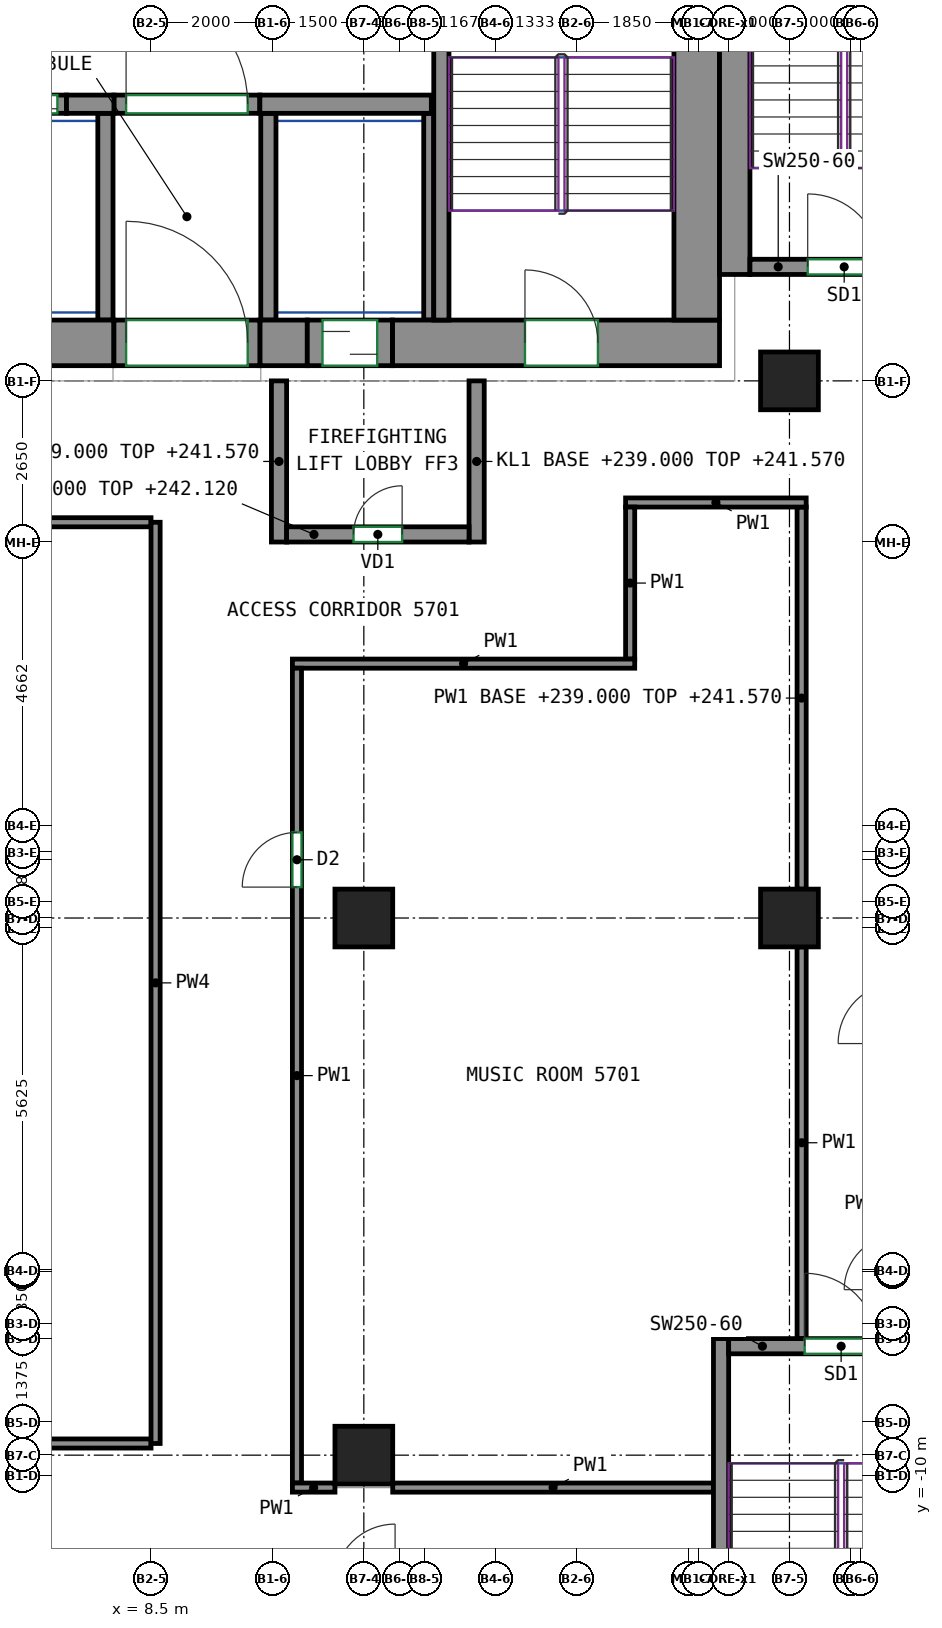
"""IFC4 building model, lengths in metres.
Left out: names, types, materials, properties, quantities, classifications, styles, units other than length and angle.
Written with IfcOpenShell. Run it as: python <this file> out.ifc"""

import sys

from ifc_helpers import new_model, si_unit, direction, frame, frame_2d, origin, origin_2d, place, context, subcontext, project, spatial, rectangle, extrude, source, transform, mapped, element, fill, save


model = new_model("IFC4")
c1 = context("Model", 3, precision=1e-05, world=origin(), true_north=direction((0.0, 1.0)))
c2 = subcontext(c1, "Body", "Model", "MODEL_VIEW")
j1 = project(units=[si_unit("LENGTHUNIT", "METRE"), si_unit("PLANEANGLEUNIT", "RADIAN")], contexts=[c1])
p1 = place(None, origin())
s1 = spatial("IfcSite", under=j1, at=p1, CompositionType="ELEMENT")
p2 = place(p1, origin())
s2 = spatial("IfcBuilding", under=s1, at=p2, CompositionType="ELEMENT")
p3 = place(p2, frame((0.0, 0.0, 239.0)))
s3 = spatial("IfcBuildingStorey", under=s2, at=p3, CompositionType="ELEMENT", Elevation=239.0)
m1 = source(origin(), c2, "Body", "SweptSolid", [
    extrude(rectangle(XDim=0.95, YDim=0.95, at=origin_2d()), origin(), (0.0, 0.0, 1.0), 3.12),
])
for number, where, z_axis, x_axis in (
    (1, (12.0, -9.667, 0.0), (0.0, 0.0, 1.0), (1.0, 0.0, 0.0)),
    (2, (12.0, -0.833, 0.0), (0.0, 0.0, 1.0), (1.0, 0.0, 0.0)),
    (3, (19.0, -0.833, 0.0), (0.0, 0.0, 1.0), (1.0, 0.0, 0.0)),
    (4, (19.0, 8.0, 0.0), (0.0, 0.0, 1.0), (1.0, 0.0, 0.0)),
):
    element("IfcColumn", number, at=place(p3, frame(where, z_axis=z_axis, x_axis=x_axis)), inside=s3, PredefinedType="COLUMN", context=c2, shape_type="MappedRepresentation", body=[
        mapped(m1, transform((0.0, 0.0, 0.0))),
    ])
m2 = source(origin(), c2, "Body", "SweptSolid", [
    extrude(rectangle(XDim=14.18, YDim=0.75, at=frame_2d((7.09, 0.0))), origin(), (0.0, 0.0, 1.0), 3.12),
])
p4 = place(p3, frame((-6.29, 8.625, 0.0), z_axis=(0.0, 0.0, 1.0), x_axis=(1.0, 0.0, 0.0)))
e5 = element("IfcWall", 5, at=p4, inside=s3, PredefinedType="SHEAR", context=c2, shape_type="MappedRepresentation", body=[
    mapped(m2, transform((0.0, 0.0, 0.0))),
])
m3 = source(origin(), c2, "Body", "SweptSolid", [
    extrude(rectangle(XDim=0.78, YDim=0.75, at=frame_2d((0.39, 0.0))), origin(), (0.0, 0.0, 1.0), 3.12),
])
p5 = place(p3, frame((10.29, 8.625, 0.0), z_axis=(0.0, 0.0, 1.0), x_axis=(1.0, 0.0, 0.0)))
e6 = element("IfcWall", 6, at=p5, inside=s3, PredefinedType="SHEAR", context=c2, shape_type="MappedRepresentation", body=[
    mapped(m3, transform((0.0, 0.0, 0.0))),
])
m4 = source(origin(), c2, "Body", "SweptSolid", [
    extrude(rectangle(XDim=5.38, YDim=0.75, at=frame_2d((2.69, 0.0))), origin(), (0.0, 0.0, 1.0), 3.12),
])
p6 = place(p3, frame((12.47, 8.625, 0.0), z_axis=(0.0, 0.0, 1.0), x_axis=(1.0, 0.0, 0.0)))
e7 = element("IfcWall", 7, at=p6, inside=s3, PredefinedType="SHEAR", context=c2, shape_type="MappedRepresentation", body=[
    mapped(m4, transform((0.0, 0.0, 0.0))),
])
p7 = place(p6, frame((2.18, 0.0, 0.0)))
e8 = element("IfcOpeningElement", 8, at=p7, cuts=e7, PredefinedType="OPENING", context=c2, shape_type="SweptSolid", body=[
    extrude(rectangle(XDim=1.2, YDim=2.1, at=frame_2d((0.6, 1.05))), frame((0.0, 0.385, 0.0), z_axis=(0.0, -1.0, 0.0), x_axis=(1.0, 0.0, 0.0)), (0.0, 0.0, 1.0), 0.77),
])
m5 = source(origin(), c2, "Body", "SweptSolid", [
    extrude(rectangle(XDim=12.0, YDim=0.75, at=frame_2d((6.0, 0.0))), origin(), (0.0, 0.0, 1.0), 3.12),
])
p8 = place(p3, frame((17.475, 9.0, 0.0), z_axis=(0.0, 0.0, 1.0), x_axis=(0.0, 1.0, 0.0)))
e9 = element("IfcWall", 9, at=p8, inside=s3, PredefinedType="SHEAR", context=c2, shape_type="MappedRepresentation", body=[
    mapped(m5, transform((0.0, 0.0, 0.0))),
])
m6 = source(origin(), c2, "Body", "SweptSolid", [
    extrude(rectangle(XDim=7.75, YDim=0.25, at=frame_2d((3.875, 0.0))), origin(), (0.0, 0.0, 1.0), 3.12),
])
p9 = place(p3, frame((13.275, 9.0, 0.0), z_axis=(0.0, 0.0, 1.0), x_axis=(0.0, 1.0, 0.0)))
e10 = element("IfcWall", 10, at=p9, inside=s3, PredefinedType="SHEAR", context=c2, shape_type="MappedRepresentation", body=[
    mapped(m6, transform((0.0, 0.0, 0.0))),
])
m7 = source(origin(), c2, "Body", "SweptSolid", [
    extrude(rectangle(XDim=8.0, YDim=0.25, at=frame_2d((4.0, 0.0))), origin(), (0.0, 0.0, 1.0), 3.12),
])
p10 = place(p3, frame((17.875, -15.75, 0.0), z_axis=(0.0, 0.0, 1.0), x_axis=(0.0, 1.0, 0.0)))
e11 = element("IfcWall", 11, at=p10, inside=s3, PredefinedType="SHEAR", context=c2, shape_type="MappedRepresentation", body=[
    mapped(m7, transform((0.0, 0.0, 0.0))),
])
m8 = source(origin(), c2, "Body", "SweptSolid", [
    extrude(rectangle(XDim=3.7, YDim=0.25, at=frame_2d((1.85, 0.0))), origin(), (0.0, 0.0, 1.0), 3.12),
])
p11 = place(p3, frame((18.0, -7.875, 0.0), z_axis=(0.0, 0.0, 1.0), x_axis=(1.0, 0.0, 0.0)))
e12 = element("IfcWall", 12, at=p11, inside=s3, PredefinedType="SHEAR", context=c2, shape_type="MappedRepresentation", body=[
    mapped(m8, transform((0.0, 0.0, 0.0))),
])
p12 = place(p11, frame((1.25, 0.0, 0.0)))
e13 = element("IfcOpeningElement", 13, at=p12, cuts=e12, PredefinedType="OPENING", context=c2, shape_type="SweptSolid", body=[
    extrude(rectangle(XDim=1.2, YDim=2.1, at=frame_2d((0.6, 1.05))), frame((0.0, 0.135, 0.0), z_axis=(0.0, -1.0, 0.0), x_axis=(1.0, 0.0, 0.0)), (0.0, 0.0, 1.0), 0.27),
])
m9 = source(origin(), c2, "Body", "SweptSolid", [
    extrude(rectangle(XDim=8.0, YDim=0.5, at=frame_2d((4.0, 0.0))), origin(), (0.0, 0.0, 1.0), 3.12),
])
p13 = place(p3, frame((18.1, 9.75, 0.0), z_axis=(0.0, 0.0, 1.0), x_axis=(0.0, 1.0, 0.0)))
e14 = element("IfcWall", 14, at=p13, inside=s3, PredefinedType="SHEAR", context=c2, shape_type="MappedRepresentation", body=[
    mapped(m9, transform((0.0, 0.0, 0.0))),
])
m10 = source(origin(), c2, "Body", "SweptSolid", [
    extrude(rectangle(XDim=3.1, YDim=0.25, at=frame_2d((1.55, 0.0))), origin(), (0.0, 0.0, 1.0), 3.12),
])
p14 = place(p3, frame((18.35, 9.875, 0.0), z_axis=(0.0, 0.0, 1.0), x_axis=(1.0, 0.0, 0.0)))
e15 = element("IfcWall", 15, at=p14, inside=s3, PredefinedType="SHEAR", context=c2, shape_type="MappedRepresentation", body=[
    mapped(m10, transform((0.0, 0.0, 0.0))),
])
p15 = place(p14, frame((0.95, 0.0, 0.0)))
e16 = element("IfcOpeningElement", 16, at=p15, cuts=e15, PredefinedType="OPENING", context=c2, shape_type="SweptSolid", body=[
    extrude(rectangle(XDim=1.2, YDim=2.1, at=frame_2d((0.6, 1.05))), frame((0.0, 0.135, 0.0), z_axis=(0.0, -1.0, 0.0), x_axis=(1.0, 0.0, 0.0)), (0.0, 0.0, 1.0), 0.27),
])
m11 = source(origin(), c2, "Body", "SweptSolid", [
    extrude(rectangle(XDim=0.78, YDim=0.3, at=frame_2d((0.39, 0.0))), origin(), (0.0, 0.0, 1.0), 3.12),
])
p16 = place(p3, frame((7.11, 12.55, 0.0), z_axis=(0.0, 0.0, 1.0), x_axis=(1.0, 0.0, 0.0)))
e17 = element("IfcWall", 17, at=p16, inside=s3, PredefinedType="SHEAR", context=c2, shape_type="MappedRepresentation", body=[
    mapped(m11, transform((0.0, 0.0, 0.0))),
])
m12 = source(origin(), c2, "Body", "SweptSolid", [
    extrude(rectangle(XDim=2.82, YDim=0.3, at=frame_2d((1.41, 0.0))), origin(), (0.0, 0.0, 1.0), 3.12),
])
p17 = place(p3, frame((10.29, 12.55, 0.0), z_axis=(0.0, 0.0, 1.0), x_axis=(1.0, 0.0, 0.0)))
e18 = element("IfcWall", 18, at=p17, inside=s3, PredefinedType="SHEAR", context=c2, shape_type="MappedRepresentation", body=[
    mapped(m12, transform((0.0, 0.0, 0.0))),
])
m13 = source(origin(), c2, "Body", "SweptSolid", [
    extrude(rectangle(XDim=1.4, YDim=0.3, at=frame_2d((0.7, 0.0))), origin(), (0.0, 0.0, 1.0), 3.12),
])
p18 = place(p3, frame((5.71, 12.55, 0.0), z_axis=(0.0, 0.0, 1.0), x_axis=(1.0, 0.0, 0.0)))
e19 = element("IfcWall", 19, at=p18, inside=s3, PredefinedType="PARTITIONING", context=c2, shape_type="MappedRepresentation", body=[
    mapped(m13, transform((0.0, 0.0, 0.0))),
])
p19 = place(p18, frame((0.15, 0.0, 0.0)))
e20 = element("IfcOpeningElement", 20, at=p19, cuts=e19, PredefinedType="OPENING", context=c2, shape_type="SweptSolid", body=[
    extrude(rectangle(XDim=1.1, YDim=2.1, at=frame_2d((0.55, 1.05))), frame((0.0, 0.16, 0.0), z_axis=(0.0, -1.0, 0.0), x_axis=(1.0, 0.0, 0.0)), (0.0, 0.0, 1.0), 0.32),
])
m14 = source(origin(), c2, "Body", "SweptSolid", [
    extrude(rectangle(XDim=2.4, YDim=0.3, at=frame_2d((1.2, 0.0))), origin(), (0.0, 0.0, 1.0), 3.12),
])
p20 = place(p3, frame((7.89, 12.55, 0.0), z_axis=(0.0, 0.0, 1.0), x_axis=(1.0, 0.0, 0.0)))
e21 = element("IfcWall", 21, at=p20, inside=s3, PredefinedType="PARTITIONING", context=c2, shape_type="MappedRepresentation", body=[
    mapped(m14, transform((0.0, 0.0, 0.0))),
])
p21 = place(p20, frame((0.2, 0.0, 0.0)))
e22 = element("IfcOpeningElement", 22, at=p21, cuts=e21, PredefinedType="OPENING", context=c2, shape_type="SweptSolid", body=[
    extrude(rectangle(XDim=2.0, YDim=2.1, at=frame_2d((1.0, 1.05))), frame((0.0, 0.16, 0.0), z_axis=(0.0, -1.0, 0.0), x_axis=(1.0, 0.0, 0.0)), (0.0, 0.0, 1.0), 0.32),
])
m15 = source(origin(), c2, "Body", "SweptSolid", [
    extrude(rectangle(XDim=2.65, YDim=0.25, at=frame_2d((1.325, 0.0))), origin(), (0.0, 0.0, 1.0), 2.57),
])
for number, where, z_axis, x_axis in (
    (23, (10.605, 5.35, 0.0), (0.0, 0.0, 1.0), (0.0, 1.0, 0.0)),
    (24, (13.855, 5.35, 0.0), (0.0, 0.0, 1.0), (0.0, 1.0, 0.0)),
):
    element("IfcWall", number, at=place(p3, frame(where, z_axis=z_axis, x_axis=x_axis)), inside=s3, PredefinedType="PARTITIONING", context=c2, shape_type="MappedRepresentation", body=[
        mapped(m15, transform((0.0, 0.0, 0.0))),
    ])
m16 = source(origin(), c2, "Body", "SweptSolid", [
    extrude(rectangle(XDim=3.0, YDim=0.25, at=frame_2d((1.5, 0.0))), origin(), (0.0, 0.0, 1.0), 3.12),
])
p22 = place(p3, frame((10.73, 5.475, 0.0), z_axis=(0.0, 0.0, 1.0), x_axis=(1.0, 0.0, 0.0)))
e25 = element("IfcWall", 25, at=p22, inside=s3, PredefinedType="PARTITIONING", context=c2, shape_type="MappedRepresentation", body=[
    mapped(m16, transform((0.0, 0.0, 0.0))),
])
p23 = place(p22, frame((1.1, 0.0, 0.0)))
e26 = element("IfcOpeningElement", 26, at=p23, cuts=e25, PredefinedType="OPENING", context=c2, shape_type="SweptSolid", body=[
    extrude(rectangle(XDim=0.8, YDim=2.0, at=frame_2d((0.4, 1.0))), frame((0.0, 0.135, 0.0), z_axis=(0.0, -1.0, 0.0), x_axis=(1.0, 0.0, 0.0)), (0.0, 0.0, 1.0), 0.27),
])
m17 = source(origin(), c2, "Body", "SweptSolid", [
    extrude(rectangle(XDim=3.4, YDim=0.25, at=frame_2d((1.7, 0.0))), origin(), (0.0, 0.0, 1.0), 3.12),
])
p24 = place(p3, frame((10.43, 9.0, 0.0), z_axis=(0.0, 0.0, 1.0), x_axis=(0.0, 1.0, 0.0)))
e27 = element("IfcWall", 27, at=p24, inside=s3, PredefinedType="PARTITIONING", context=c2, shape_type="MappedRepresentation", body=[
    mapped(m17, transform((0.0, 0.0, 0.0))),
])
m18 = source(origin(), c2, "Body", "SweptSolid", [
    extrude(rectangle(XDim=3.4, YDim=0.165, at=frame_2d((1.7, 0.0))), origin(), (0.0, 0.0, 1.0), 3.12),
])
p25 = place(p3, frame((13.067, 9.0, 0.0), z_axis=(0.0, 0.0, 1.0), x_axis=(0.0, 1.0, 0.0)))
e28 = element("IfcWall", 28, at=p25, inside=s3, PredefinedType="PARTITIONING", context=c2, shape_type="MappedRepresentation", body=[
    mapped(m18, transform((0.0, 0.0, 0.0))),
])
p26 = place(p3, frame((7.75, 9.0, 0.0), z_axis=(0.0, 0.0, 1.0), x_axis=(0.0, 1.0, 0.0)))
e29 = element("IfcWall", 29, at=p26, inside=s3, PredefinedType="PARTITIONING", context=c2, shape_type="MappedRepresentation", body=[
    mapped(m17, transform((0.0, 0.0, 0.0))),
])
m19 = source(origin(), c2, "Body", "SweptSolid", [
    extrude(rectangle(XDim=2.4, YDim=0.75, at=frame_2d((1.2, 0.0))), origin(), (0.0, 0.0, 1.0), 2.7),
])
p27 = place(p3, frame((7.89, 8.625, 0.0), z_axis=(0.0, 0.0, 1.0), x_axis=(1.0, 0.0, 0.0)))
e30 = element("IfcWall", 30, at=p27, inside=s3, PredefinedType="PARTITIONING", context=c2, shape_type="MappedRepresentation", body=[
    mapped(m19, transform((0.0, 0.0, 0.0))),
])
p28 = place(p27, frame((0.2, 0.0, 0.0)))
e31 = element("IfcOpeningElement", 31, at=p28, cuts=e30, PredefinedType="OPENING", context=c2, shape_type="SweptSolid", body=[
    extrude(rectangle(XDim=2.0, YDim=2.1, at=frame_2d((1.0, 1.05))), frame((0.0, 0.385, 0.0), z_axis=(0.0, -1.0, 0.0), x_axis=(1.0, 0.0, 0.0)), (0.0, 0.0, 1.0), 0.77),
])
m20 = source(origin(), c2, "Body", "SweptSolid", [
    extrude(rectangle(XDim=1.4, YDim=0.75, at=frame_2d((0.7, 0.0))), origin(), (0.0, 0.0, 1.0), 2.7),
])
p29 = place(p3, frame((11.07, 8.625, 0.0), z_axis=(0.0, 0.0, 1.0), x_axis=(1.0, 0.0, 0.0)))
e32 = element("IfcWall", 32, at=p29, inside=s3, PredefinedType="PARTITIONING", context=c2, shape_type="MappedRepresentation", body=[
    mapped(m20, transform((0.0, 0.0, 0.0))),
])
p30 = place(p29, frame((0.25, 0.0, 0.0)))
e33 = element("IfcOpeningElement", 33, at=p30, cuts=e32, PredefinedType="OPENING", context=c2, shape_type="SweptSolid", body=[
    extrude(rectangle(XDim=0.9, YDim=2.1, at=frame_2d((0.45, 1.05))), frame((0.0, 0.385, 0.0), z_axis=(0.0, -1.0, 0.0), x_axis=(1.0, 0.0, 0.0)), (0.0, 0.0, 1.0), 0.77),
])
p31 = place(p3, frame((19.2, -7.75, 0.0), z_axis=(0.0, 0.0, 1.0), x_axis=(0.0, 1.0, 0.0)))
e34 = element("IfcWall", 34, at=p31, inside=s3, PredefinedType="PARTITIONING", context=c2, shape_type="SweptSolid", body=[
    extrude(rectangle(XDim=6.442, YDim=0.15, at=frame_2d((3.221, 0.0))), origin(), (0.0, 0.0, 1.0), 3.12),
])
p32 = place(p3, frame((19.2, -0.358, 0.0), z_axis=(0.0, 0.0, 1.0), x_axis=(0.0, 1.0, 0.0)))
e35 = element("IfcWall", 35, at=p32, inside=s3, PredefinedType="PARTITIONING", context=c2, shape_type="SweptSolid", body=[
    extrude(rectangle(XDim=6.283, YDim=0.15, at=frame_2d((3.142, 0.0))), origin(), (0.0, 0.0, 1.0), 2.57),
])
p33 = place(p3, frame((16.305, 6.0, 0.0), z_axis=(0.0, 0.0, 1.0), x_axis=(1.0, 0.0, 0.0)))
e36 = element("IfcWall", 36, at=p33, inside=s3, PredefinedType="PARTITIONING", context=c2, shape_type="SweptSolid", body=[
    extrude(rectangle(XDim=2.97, YDim=0.15, at=frame_2d((1.485, 0.0))), origin(), (0.0, 0.0, 1.0), 3.12),
])
p34 = place(p3, frame((16.38, 3.425, 0.0), z_axis=(0.0, 0.0, 1.0), x_axis=(0.0, 1.0, 0.0)))
e37 = element("IfcWall", 37, at=p34, inside=s3, PredefinedType="PARTITIONING", context=c2, shape_type="SweptSolid", body=[
    extrude(rectangle(XDim=2.5, YDim=0.15, at=frame_2d((1.25, 0.0))), origin(), (0.0, 0.0, 1.0), 3.12),
])
p35 = place(p3, frame((10.825, 3.35, 0.0), z_axis=(0.0, 0.0, 1.0), x_axis=(1.0, 0.0, 0.0)))
e38 = element("IfcWall", 38, at=p35, inside=s3, PredefinedType="PARTITIONING", context=c2, shape_type="SweptSolid", body=[
    extrude(rectangle(XDim=5.63, YDim=0.15, at=frame_2d((2.815, 0.0))), origin(), (0.0, 0.0, 1.0), 3.12),
])
p36 = place(p3, frame((10.9, -10.125, 0.0), z_axis=(0.0, 0.0, 1.0), x_axis=(0.0, 1.0, 0.0)))
e39 = element("IfcWall", 39, at=p36, inside=s3, PredefinedType="PARTITIONING", context=c2, shape_type="SweptSolid", body=[
    extrude(rectangle(XDim=13.4, YDim=0.15, at=frame_2d((6.7, 0.0))), origin(), (0.0, 0.0, 1.0), 3.12),
])
p37 = place(p36, frame((9.8, 0.0, 0.0)))
e40 = element("IfcOpeningElement", 40, at=p37, cuts=e39, PredefinedType="OPENING", context=c2, shape_type="SweptSolid", body=[
    extrude(rectangle(XDim=0.9, YDim=2.1, at=frame_2d((0.45, 1.05))), frame((0.0, 0.085, 0.0), z_axis=(0.0, -1.0, 0.0), x_axis=(1.0, 0.0, 0.0)), (0.0, 0.0, 1.0), 0.17),
])
p38 = place(p3, frame((12.475, -10.2, 0.0), z_axis=(0.0, 0.0, 1.0), x_axis=(1.0, 0.0, 0.0)))
e41 = element("IfcWall", 41, at=p38, inside=s3, PredefinedType="PARTITIONING", context=c2, shape_type="SweptSolid", body=[
    extrude(rectangle(XDim=5.275, YDim=0.15, at=frame_2d((2.637, 0.0))), origin(), (0.0, 0.0, 1.0), 3.12),
])
p39 = place(p3, frame((10.825, -10.2, 0.0), z_axis=(0.0, 0.0, 1.0), x_axis=(1.0, 0.0, 0.0)))
e42 = element("IfcWall", 42, at=p39, inside=s3, PredefinedType="PARTITIONING", context=c2, shape_type="SweptSolid", body=[
    extrude(rectangle(XDim=0.7, YDim=0.15, at=frame_2d((0.35, 0.0))), origin(), (0.0, 0.0, 1.0), 3.12),
])
for number, where, z_axis, x_axis in (
    (43, (8.5, -9.475, 0.0), (0.0, 0.0, 1.0), (-1.0, 0.0, 0.0)),
    (44, (-6.575, 5.675, 0.0), (0.0, 0.0, 1.0), (1.0, 0.0, 0.0)),
):
    element("IfcWall", number, at=place(p3, frame(where, z_axis=z_axis, x_axis=x_axis)), inside=s3, PredefinedType="PARTITIONING", context=c2, shape_type="SweptSolid", body=[
        extrude(rectangle(XDim=15.075, YDim=0.15, at=frame_2d((7.538, 0.0))), origin(), (0.0, 0.0, 1.0), 3.12),
    ])
p40 = place(p3, frame((8.575, 5.675, 0.0), z_axis=(0.0, 0.0, 1.0), x_axis=(0.0, -1.0, 0.0)))
e45 = element("IfcWall", 45, at=p40, inside=s3, PredefinedType="PARTITIONING", context=c2, shape_type="SweptSolid", body=[
    extrude(rectangle(XDim=15.15, YDim=0.15, at=frame_2d((7.575, 0.0))), origin(), (0.0, 0.0, 1.0), 3.12),
])
p41 = place(p21, origin())
e46 = element("IfcDoor", 46, at=p41, inside=s3, OperationType="DOUBLE_DOOR_SINGLE_SWING", PredefinedType="DOOR", context=c2, shape_type="SweptSolid", body=[
    extrude(rectangle(XDim=2.0, YDim=2.1, at=frame_2d((1.0, 1.05))), frame((0.0, 0.025, 0.0), z_axis=(0.0, -1.0, 0.0), x_axis=(1.0, 0.0, 0.0)), (0.0, 0.0, 1.0), 0.05),
])
fill(e22, e46)
p42 = place(p28, origin())
e47 = element("IfcDoor", 47, at=p42, inside=s3, OperationType="DOUBLE_DOOR_SINGLE_SWING", PredefinedType="DOOR", context=c2, shape_type="SweptSolid", body=[
    extrude(rectangle(XDim=2.0, YDim=2.1, at=frame_2d((1.0, 1.05))), frame((0.0, 0.28, 0.0), z_axis=(0.0, -1.0, 0.0), x_axis=(1.0, 0.0, 0.0)), (0.0, 0.0, 1.0), 0.05),
])
fill(e31, e47)
p43 = place(p23, origin())
e48 = element("IfcDoor", 48, at=p43, inside=s3, OperationType="SINGLE_SWING_RIGHT", PredefinedType="DOOR", context=c2, shape_type="SweptSolid", body=[
    extrude(rectangle(XDim=0.8, YDim=2.0, at=frame_2d((0.4, 1.0))), frame((0.0, 0.025, 0.0), z_axis=(0.0, -1.0, 0.0), x_axis=(1.0, 0.0, 0.0)), (0.0, 0.0, 1.0), 0.05),
])
fill(e26, e48)
p44 = place(p30, origin())
e49 = element("IfcDoor", 49, at=p44, inside=s3, OperationType="SLIDING_TO_LEFT", PredefinedType="DOOR", context=c2, shape_type="SweptSolid", body=[
    extrude(rectangle(XDim=0.9, YDim=2.1, at=frame_2d((0.45, 1.05))), frame((0.0, 0.28, 0.0), z_axis=(0.0, -1.0, 0.0), x_axis=(1.0, 0.0, 0.0)), (0.0, 0.0, 1.0), 0.05),
])
fill(e33, e49)
p45 = place(p19, origin())
e50 = element("IfcDoor", 50, at=p45, inside=s3, OperationType="DOUBLE_DOOR_SLIDING", PredefinedType="DOOR", context=c2, shape_type="SweptSolid", body=[
    extrude(rectangle(XDim=1.1, YDim=2.1, at=frame_2d((0.55, 1.05))), frame((0.0, 0.025, 0.0), z_axis=(0.0, -1.0, 0.0), x_axis=(1.0, 0.0, 0.0)), (0.0, 0.0, 1.0), 0.05),
])
fill(e20, e50)
p46 = place(p7, origin())
e51 = element("IfcDoor", 51, at=p46, inside=s3, OperationType="DOUBLE_DOOR_SINGLE_SWING", PredefinedType="DOOR", context=c2, shape_type="SweptSolid", body=[
    extrude(rectangle(XDim=1.2, YDim=2.1, at=frame_2d((0.6, 1.05))), frame((0.0, 0.28, 0.0), z_axis=(0.0, -1.0, 0.0), x_axis=(1.0, 0.0, 0.0)), (0.0, 0.0, 1.0), 0.05),
])
fill(e8, e51)
p47 = place(p12, origin())
e52 = element("IfcDoor", 52, at=p47, inside=s3, OperationType="DOUBLE_DOOR_SINGLE_SWING", PredefinedType="DOOR", context=c2, shape_type="SweptSolid", body=[
    extrude(rectangle(XDim=1.2, YDim=2.1, at=frame_2d((0.6, 1.05))), frame((0.0, 0.025, 0.0), z_axis=(0.0, -1.0, 0.0), x_axis=(1.0, 0.0, 0.0)), (0.0, 0.0, 1.0), 0.05),
])
fill(e13, e52)
p48 = place(p15, origin())
e53 = element("IfcDoor", 53, at=p48, inside=s3, OperationType="DOUBLE_DOOR_SINGLE_SWING", PredefinedType="DOOR", context=c2, shape_type="SweptSolid", body=[
    extrude(rectangle(XDim=1.2, YDim=2.1, at=frame_2d((0.6, 1.05))), frame((0.0, 0.025, 0.0), z_axis=(0.0, -1.0, 0.0), x_axis=(1.0, 0.0, 0.0)), (0.0, 0.0, 1.0), 0.05),
])
fill(e16, e53)
p49 = place(p37, origin())
e54 = element("IfcDoor", 54, at=p49, inside=s3, OperationType="SINGLE_SWING_LEFT", PredefinedType="DOOR", context=c2, shape_type="SweptSolid", body=[
    extrude(rectangle(XDim=0.9, YDim=2.1, at=frame_2d((0.45, 1.05))), frame((0.0, 0.025, 0.0), z_axis=(0.0, -1.0, 0.0), x_axis=(1.0, 0.0, 0.0)), (0.0, 0.0, 1.0), 0.05),
])
fill(e40, e54)
save(model, sys.argv[1])
